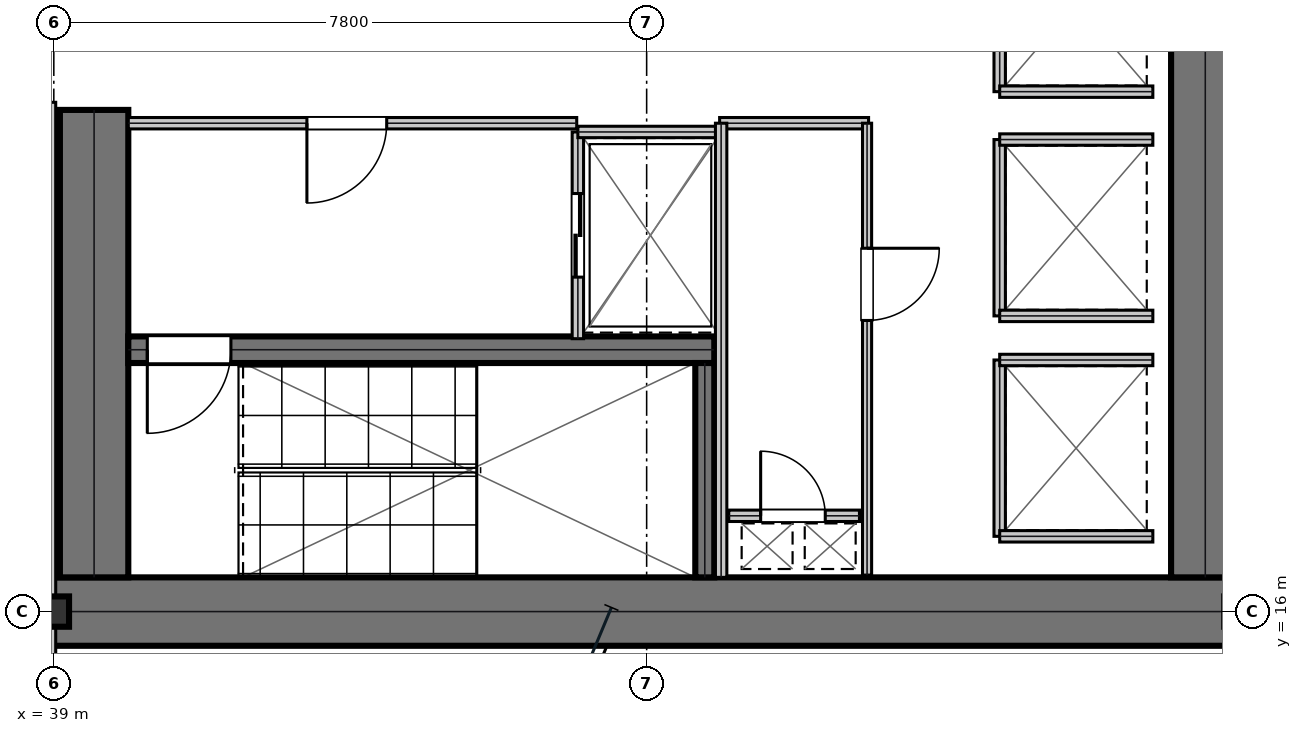
"""IFC4 building model, lengths in metres.
Left out: names, types, materials, properties, quantities, classifications, styles, units other than length and angle.
Written with IfcOpenShell. Run it as: python <this file> out.ifc"""

import sys

from ifc_helpers import new_model, si_unit, direction, frame, frame_2d, origin, origin_2d, place, context, subcontext, project, spatial, rectangle, i_section, extrude, element, fill, save


model = new_model("IFC4")
c1 = context("Model", 3, precision=1e-05, world=origin(), true_north=direction((0.0, 1.0)))
c2 = subcontext(c1, "Body", "Model", "MODEL_VIEW")
j1 = project(units=[si_unit("LENGTHUNIT", "METRE"), si_unit("PLANEANGLEUNIT", "RADIAN")], contexts=[c1])
p1 = place(None, origin())
s1 = spatial("IfcSite", under=j1, at=p1, CompositionType="ELEMENT")
p2 = place(p1, origin())
s2 = spatial("IfcBuilding", under=s1, at=p2, CompositionType="ELEMENT")
p3 = place(p2, frame((0.0, 0.0, 82.35)))
s3 = spatial("IfcBuildingStorey", under=s2, at=p3, CompositionType="ELEMENT", Elevation=82.35)
p4 = place(p3, frame((38.8, 16.0, 0.0), z_axis=(0.0, 0.0, 1.0), x_axis=(1.0, 0.0, 0.0)))
e1 = element("IfcWall", 1, at=p4, inside=s3, PredefinedType="SHEAR", context=c2, shape_type="SweptSolid", body=[
    extrude(rectangle(XDim=16.0, YDim=0.9, at=frame_2d((8.0, 0.0))), origin(), (0.0, 0.0, 1.0), 3.81),
])
p5 = place(p3, frame((39.53, 16.45, 0.0), z_axis=(0.0, 0.0, 1.0), x_axis=(0.0, 1.0, 0.0)))
e2 = element("IfcWall", 2, at=p5, inside=s3, PredefinedType="SHEAR", context=c2, shape_type="SweptSolid", body=[
    extrude(rectangle(XDim=6.15, YDim=0.9, at=frame_2d((3.075, 0.0))), origin(), (0.0, 0.0, 1.0), 3.81),
])
p6 = place(p3, frame((54.15, 16.45, 0.0), z_axis=(0.0, 0.0, 1.0), x_axis=(0.0, 1.0, 0.0)))
e3 = element("IfcWall", 3, at=p6, inside=s3, PredefinedType="SHEAR", context=c2, shape_type="SweptSolid", body=[
    extrude(rectangle(XDim=15.1, YDim=0.9, at=frame_2d((7.55, 0.0))), origin(), (0.0, 0.0, 1.0), 3.81),
])
p7 = place(p3, frame((39.98, 19.445, 0.0), z_axis=(0.0, 0.0, 1.0), x_axis=(1.0, 0.0, 0.0)))
e4 = element("IfcWall", 4, at=p7, inside=s3, PredefinedType="SHEAR", context=c2, shape_type="SweptSolid", body=[
    extrude(rectangle(XDim=7.71, YDim=0.35, at=frame_2d((3.855, 0.0))), origin(), (0.0, 0.0, 1.0), 3.81),
])
p8 = place(p7, frame((0.25, 0.0, 0.0)))
e5 = element("IfcOpeningElement", 5, at=p8, cuts=e4, PredefinedType="OPENING", context=c2, shape_type="SweptSolid", body=[
    extrude(rectangle(XDim=1.1, YDim=2.15, at=frame_2d((0.55, 1.075))), frame((0.0, 0.185, 0.0), z_axis=(0.0, -1.0, 0.0), x_axis=(1.0, 0.0, 0.0)), (0.0, 0.0, 1.0), 0.37),
])
p9 = place(p3, frame((47.565, 16.45, 0.0), z_axis=(0.0, 0.0, 1.0), x_axis=(0.0, 1.0, 0.0)))
e6 = element("IfcWall", 6, at=p9, inside=s3, PredefinedType="SHEAR", context=c2, shape_type="SweptSolid", body=[
    extrude(rectangle(XDim=2.82, YDim=0.25, at=frame_2d((1.41, 0.0))), origin(), (0.0, 0.0, 1.0), 3.81),
])
p10 = place(p3, frame((39.0, 16.0, 0.0), z_axis=(0.0, 0.0, 1.0), x_axis=(1.0, 0.0, 0.0)))
e7 = element("IfcColumn", 7, at=p10, inside=s3, PredefinedType="COLUMN", context=c2, shape_type="SweptSolid", body=[
    extrude(i_section(OverallWidth=0.401, OverallDepth=0.399, WebThickness=0.025, FlangeThickness=0.04, at=origin_2d()), origin(), (0.0, 0.0, 1.0), 4.044),
])
p11 = place(p3, frame((39.98, 22.425, 0.0), z_axis=(0.0, 0.0, 1.0), x_axis=(1.0, 0.0, 0.0)))
e8 = element("IfcWall", 8, at=p11, inside=s3, PredefinedType="PARTITIONING", context=c2, shape_type="SweptSolid", body=[
    extrude(rectangle(XDim=5.9, YDim=0.15, at=frame_2d((2.95, 0.0))), origin(), (0.0, 0.0, 1.0), 3.81),
])
p12 = place(p11, frame((2.35, 0.0, 0.0)))
e9 = element("IfcOpeningElement", 9, at=p12, cuts=e8, PredefinedType="OPENING", context=c2, shape_type="SweptSolid", body=[
    extrude(rectangle(XDim=1.05, YDim=2.15, at=frame_2d((0.525, 1.075))), frame((0.0, 0.085, 0.0), z_axis=(0.0, -1.0, 0.0), x_axis=(1.0, 0.0, 0.0)), (0.0, 0.0, 1.0), 0.17),
])
p13 = place(p3, frame((45.895, 19.59, 0.0), z_axis=(0.0, 0.0, 1.0), x_axis=(0.0, 1.0, 0.0)))
e10 = element("IfcWall", 10, at=p13, inside=s3, PredefinedType="PARTITIONING", context=c2, shape_type="SweptSolid", body=[
    extrude(rectangle(XDim=2.72, YDim=0.15, at=frame_2d((1.36, 0.0))), origin(), (0.0, 0.0, 1.0), 3.81),
])
p14 = place(p13, frame((0.81, 0.0, 0.0)))
e11 = element("IfcOpeningElement", 11, at=p14, cuts=e10, PredefinedType="OPENING", context=c2, shape_type="SweptSolid", body=[
    extrude(rectangle(XDim=1.1, YDim=2.15, at=frame_2d((0.55, 1.075))), frame((0.0, 0.085, 0.0), z_axis=(0.0, -1.0, 0.0), x_axis=(1.0, 0.0, 0.0)), (0.0, 0.0, 1.0), 0.17),
])
p15 = place(p3, frame((45.895, 22.31, 0.0), z_axis=(0.0, 0.0, 1.0), x_axis=(1.0, 0.0, 0.0)))
e12 = element("IfcWall", 12, at=p15, inside=s3, PredefinedType="PARTITIONING", context=c2, shape_type="SweptSolid", body=[
    extrude(rectangle(XDim=1.915, YDim=0.15, at=frame_2d((0.958, 0.0))), origin(), (0.0, 0.0, 1.0), 3.81),
])
p16 = place(p3, frame((51.445, 19.89, 0.0), z_axis=(0.0, 0.0, 1.0), x_axis=(0.0, 1.0, 0.0)))
e13 = element("IfcWall", 13, at=p16, inside=s3, PredefinedType="PARTITIONING", context=c2, shape_type="SweptSolid", body=[
    extrude(rectangle(XDim=2.32, YDim=0.15, at=frame_2d((1.16, 0.0))), origin(), (0.0, 0.0, 1.0), 3.81),
])
for number, where, z_axis, x_axis in (
    (14, (51.445, 19.89, 0.0), (0.0, 0.0, 1.0), (1.0, 0.0, 0.0)),
    (15, (51.445, 22.21, 0.0), (0.0, 0.0, 1.0), (1.0, 0.0, 0.0)),
):
    element("IfcWall", number, at=place(p3, frame(where, z_axis=z_axis, x_axis=x_axis)), inside=s3, PredefinedType="PARTITIONING", context=c2, shape_type="SweptSolid", body=[
        extrude(rectangle(XDim=2.015, YDim=0.15, at=frame_2d((1.007, 0.0))), origin(), (0.0, 0.0, 1.0), 3.81),
    ])
p17 = place(p3, frame((51.445, 22.84, 0.0), z_axis=(0.0, 0.0, 1.0), x_axis=(0.0, 1.0, 0.0)))
e16 = element("IfcWall", 16, at=p17, inside=s3, PredefinedType="PARTITIONING", context=c2, shape_type="SweptSolid", body=[
    extrude(rectangle(XDim=2.32, YDim=0.15, at=frame_2d((1.16, 0.0))), origin(), (0.0, 0.0, 1.0), 3.81),
])
p18 = place(p3, frame((51.445, 22.84, 0.0), z_axis=(0.0, 0.0, 1.0), x_axis=(1.0, 0.0, 0.0)))
e17 = element("IfcWall", 17, at=p18, inside=s3, PredefinedType="PARTITIONING", context=c2, shape_type="SweptSolid", body=[
    extrude(rectangle(XDim=2.015, YDim=0.15, at=frame_2d((1.007, 0.0))), origin(), (0.0, 0.0, 1.0), 3.81),
])
p19 = place(p3, frame((51.445, 16.99, 0.0), z_axis=(0.0, 0.0, 1.0), x_axis=(0.0, 1.0, 0.0)))
e18 = element("IfcWall", 18, at=p19, inside=s3, PredefinedType="PARTITIONING", context=c2, shape_type="SweptSolid", body=[
    extrude(rectangle(XDim=2.32, YDim=0.15, at=frame_2d((1.16, 0.0))), origin(), (0.0, 0.0, 1.0), 3.81),
])
for number, where, z_axis, x_axis in (
    (19, (51.445, 16.99, 0.0), (0.0, 0.0, 1.0), (1.0, 0.0, 0.0)),
    (20, (51.445, 19.31, 0.0), (0.0, 0.0, 1.0), (1.0, 0.0, 0.0)),
):
    element("IfcWall", number, at=place(p3, frame(where, z_axis=z_axis, x_axis=x_axis)), inside=s3, PredefinedType="PARTITIONING", context=c2, shape_type="SweptSolid", body=[
        extrude(rectangle(XDim=2.015, YDim=0.15, at=frame_2d((1.007, 0.0))), origin(), (0.0, 0.0, 1.0), 3.81),
    ])
p20 = place(p3, frame((47.88, 17.26, 0.0), z_axis=(0.0, 0.0, 1.0), x_axis=(1.0, 0.0, 0.0)))
e21 = element("IfcWall", 21, at=p20, inside=s3, PredefinedType="PARTITIONING", context=c2, shape_type="SweptSolid", body=[
    extrude(rectangle(XDim=1.72, YDim=0.15, at=frame_2d((0.86, 0.0))), origin(), (0.0, 0.0, 1.0), 3.81),
])
p21 = place(p20, frame((0.42, 0.0, 0.0)))
e22 = element("IfcOpeningElement", 22, at=p21, cuts=e21, PredefinedType="OPENING", context=c2, shape_type="SweptSolid", body=[
    extrude(rectangle(XDim=0.85, YDim=2.15, at=frame_2d((0.425, 1.075))), frame((0.0, 0.085, 0.0), z_axis=(0.0, -1.0, 0.0), x_axis=(1.0, 0.0, 0.0)), (0.0, 0.0, 1.0), 0.17),
])
p22 = place(p3, frame((47.76, 22.425, 0.0), z_axis=(0.0, 0.0, 1.0), x_axis=(1.0, 0.0, 0.0)))
e23 = element("IfcWall", 23, at=p22, inside=s3, PredefinedType="PARTITIONING", context=c2, shape_type="SweptSolid", body=[
    extrude(rectangle(XDim=1.96, YDim=0.15, at=frame_2d((0.98, 0.0))), origin(), (0.0, 0.0, 1.0), 3.81),
])
p23 = place(p3, frame((47.78, 16.45, 0.0), z_axis=(0.0, 0.0, 1.0), x_axis=(0.0, 1.0, 0.0)))
e24 = element("IfcWall", 24, at=p23, inside=s3, PredefinedType="PARTITIONING", context=c2, shape_type="SweptSolid", body=[
    extrude(rectangle(XDim=5.975, YDim=0.15, at=frame_2d((2.988, 0.0))), origin(), (0.0, 0.0, 1.0), 3.81),
])
p24 = place(p3, frame((49.7, 16.48, 0.0), z_axis=(0.0, 0.0, 1.0), x_axis=(0.0, 1.0, 0.0)))
e25 = element("IfcWall", 25, at=p24, inside=s3, PredefinedType="PARTITIONING", context=c2, shape_type="SweptSolid", body=[
    extrude(rectangle(XDim=5.945, YDim=0.12, at=frame_2d((2.973, 0.0))), origin(), (0.0, 0.0, 1.0), 3.81),
])
p25 = place(p24, frame((3.35, 0.0, 0.0)))
e26 = element("IfcOpeningElement", 26, at=p25, cuts=e25, PredefinedType="OPENING", context=c2, shape_type="SweptSolid", body=[
    extrude(rectangle(XDim=0.95, YDim=2.15, at=frame_2d((0.475, 1.075))), frame((0.0, 0.07, 0.0), z_axis=(0.0, -1.0, 0.0), x_axis=(1.0, 0.0, 0.0)), (0.0, 0.0, 1.0), 0.14),
])
p26 = place(p3, frame((38.95, 14.546, 0.0), z_axis=(0.0, 0.0, 1.0), x_axis=(0.0, 1.0, 0.0)))
e27 = element("IfcWall", 27, at=p26, inside=s3, PredefinedType="PARTITIONING", context=c2, shape_type="SweptSolid", body=[
    extrude(rectangle(XDim=8.154, YDim=0.15, at=frame_2d((4.077, 0.0))), origin(), (0.0, 0.0, 1.0), 3.181),
])
p27 = place(p12, frame((1.05, 0.0, 0.0), z_axis=(0.0, 0.0, 1.0), x_axis=(-1.0, 0.0, 0.0)))
e28 = element("IfcDoor", 28, at=p27, inside=s3, OperationType="SINGLE_SWING_RIGHT", PredefinedType="DOOR", context=c2, shape_type="SweptSolid", body=[
    extrude(rectangle(XDim=1.05, YDim=2.15, at=frame_2d((0.525, 1.075))), frame((0.0, 0.025, 0.0), z_axis=(0.0, -1.0, 0.0), x_axis=(1.0, 0.0, 0.0)), (0.0, 0.0, 1.0), 0.05),
])
fill(e9, e28)
p28 = place(p14, frame((1.1, 0.0, 0.0), z_axis=(0.0, 0.0, 1.0), x_axis=(-1.0, 0.0, 0.0)))
e29 = element("IfcDoor", 29, at=p28, inside=s3, OperationType="DOUBLE_DOOR_SLIDING", PredefinedType="DOOR", context=c2, shape_type="SweptSolid", body=[
    extrude(rectangle(XDim=1.1, YDim=2.15, at=frame_2d((0.55, 1.075))), frame((0.0, 0.025, 0.0), z_axis=(0.0, -1.0, 0.0), x_axis=(1.0, 0.0, 0.0)), (0.0, 0.0, 1.0), 0.05),
])
fill(e11, e29)
p29 = place(p21, origin())
e30 = element("IfcDoor", 30, at=p29, inside=s3, OperationType="SINGLE_SWING_LEFT", PredefinedType="TRAPDOOR", context=c2, shape_type="SweptSolid", body=[
    extrude(rectangle(XDim=0.85, YDim=2.15, at=frame_2d((0.425, 1.075))), frame((0.0, 0.025, 0.0), z_axis=(0.0, -1.0, 0.0), x_axis=(1.0, 0.0, 0.0)), (0.0, 0.0, 1.0), 0.05),
])
fill(e22, e30)
p30 = place(p25, frame((0.95, 0.0, 0.0), z_axis=(0.0, 0.0, 1.0), x_axis=(-1.0, 0.0, 0.0)))
e31 = element("IfcDoor", 31, at=p30, inside=s3, OperationType="SINGLE_SWING_LEFT", PredefinedType="DOOR", context=c2, shape_type="SweptSolid", body=[
    extrude(rectangle(XDim=0.95, YDim=2.15, at=frame_2d((0.475, 1.075))), frame((0.0, 0.025, 0.0), z_axis=(0.0, -1.0, 0.0), x_axis=(1.0, 0.0, 0.0)), (0.0, 0.0, 1.0), 0.05),
])
fill(e26, e31)
p31 = place(p8, frame((1.1, 0.0, 0.0), z_axis=(0.0, 0.0, 1.0), x_axis=(-1.0, 0.0, 0.0)))
e32 = element("IfcDoor", 32, at=p31, inside=s3, OperationType="SINGLE_SWING_RIGHT", PredefinedType="DOOR", context=c2, shape_type="SweptSolid", body=[
    extrude(rectangle(XDim=1.1, YDim=2.15, at=frame_2d((0.55, 1.075))), frame((0.0, 0.025, 0.0), z_axis=(0.0, -1.0, 0.0), x_axis=(1.0, 0.0, 0.0)), (0.0, 0.0, 1.0), 0.05),
])
fill(e5, e32)
save(model, sys.argv[1])
